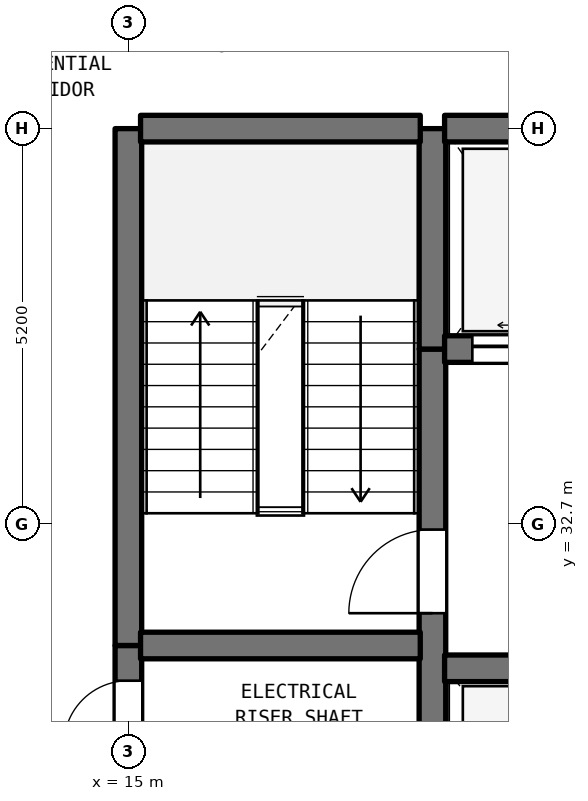
"""IFC4 building model, lengths in metres.
Left out: names, types, materials, properties, quantities, classifications, styles, units other than length and angle.
Written with IfcOpenShell. Run it as: python <this file> out.ifc"""

import sys

from ifc_helpers import new_model, si_unit, direction, frame, frame_2d, origin, place, context, subcontext, project, spatial, rectangle, extrude, element, fill, save


model = new_model("IFC4")
c1 = context("Model", 3, precision=1e-05, world=origin(), true_north=direction((0.0, 1.0)))
c2 = subcontext(c1, "Body", "Model", "MODEL_VIEW")
j1 = project(units=[si_unit("LENGTHUNIT", "METRE"), si_unit("PLANEANGLEUNIT", "RADIAN")], contexts=[c1])
p1 = place(None, origin())
s1 = spatial("IfcSite", under=j1, at=p1, CompositionType="ELEMENT")
p2 = place(p1, origin())
s2 = spatial("IfcBuilding", under=s1, at=p2, CompositionType="ELEMENT")
p3 = place(p2, frame((0.0, 0.0, 98.3)))
s3 = spatial("IfcBuildingStorey", under=s2, at=p3, CompositionType="ELEMENT", Elevation=98.3)
p4 = place(p3, frame((15.0, 29.5, 0.0), z_axis=(0.0, 0.0, 1.0), x_axis=(0.0, 1.0, 0.0)))
e1 = element("IfcWall", 1, at=p4, inside=s3, PredefinedType="SHEAR", context=c2, shape_type="SweptSolid", body=[
    extrude(rectangle(XDim=1.6, YDim=0.35, at=frame_2d((0.8, 0.0))), origin(), (0.0, 0.0, 1.0), 3.385),
])
p5 = place(p4, frame((0.287, 0.0, 0.0)))
e2 = element("IfcOpeningElement", 2, at=p5, cuts=e1, PredefinedType="OPENING", context=c2, shape_type="SweptSolid", body=[
    extrude(rectangle(XDim=0.85, YDim=2.1, at=frame_2d((0.425, 1.05))), frame((0.0, 0.185, 0.0), z_axis=(0.0, -1.0, 0.0), x_axis=(1.0, 0.0, 0.0)), (0.0, 0.0, 1.0), 0.37),
])
p6 = place(p3, frame((15.0, 31.1, 0.0), z_axis=(0.0, 0.0, 1.0), x_axis=(0.0, 1.0, 0.0)))
e3 = element("IfcWall", 3, at=p6, inside=s3, PredefinedType="SHEAR", context=c2, shape_type="SweptSolid", body=[
    extrude(rectangle(XDim=6.8, YDim=0.35, at=frame_2d((3.4, 0.0))), origin(), (0.0, 0.0, 1.0), 3.385),
])
p7 = place(p3, frame((19.0, 29.5, 0.0), z_axis=(0.0, 0.0, 1.0), x_axis=(0.0, 1.0, 0.0)))
e4 = element("IfcWall", 4, at=p7, inside=s3, PredefinedType="SHEAR", context=c2, shape_type="SweptSolid", body=[
    extrude(rectangle(XDim=5.5, YDim=0.35, at=frame_2d((2.75, 0.0))), origin(), (0.0, 0.0, 1.0), 3.385),
])
p8 = place(p7, frame((2.025, 0.0, 0.0)))
e5 = element("IfcOpeningElement", 5, at=p8, cuts=e4, PredefinedType="OPENING", context=c2, shape_type="SweptSolid", body=[
    extrude(rectangle(XDim=1.1, YDim=2.15, at=frame_2d((0.55, 1.075))), frame((0.0, 0.185, 0.0), z_axis=(0.0, -1.0, 0.0), x_axis=(1.0, 0.0, 0.0)), (0.0, 0.0, 1.0), 0.37),
])
p9 = place(p3, frame((19.0, 35.0, 0.0), z_axis=(0.0, 0.0, 1.0), x_axis=(0.0, 1.0, 0.0)))
e6 = element("IfcWall", 6, at=p9, inside=s3, PredefinedType="SHEAR", context=c2, shape_type="SweptSolid", body=[
    extrude(rectangle(XDim=2.9, YDim=0.35, at=frame_2d((1.45, 0.0))), origin(), (0.0, 0.0, 1.0), 3.385),
])
p10 = place(p3, frame((19.16, 30.8, 0.0), z_axis=(0.0, 0.0, 1.0), x_axis=(1.0, 0.0, 0.0)))
e7 = element("IfcWall", 7, at=p10, inside=s3, PredefinedType="SHEAR", context=c2, shape_type="SweptSolid", body=[
    extrude(rectangle(XDim=4.48, YDim=0.35, at=frame_2d((2.24, 0.0))), origin(), (0.0, 0.0, 1.0), 3.385),
])
p11 = place(p3, frame((15.16, 31.1, 0.0), z_axis=(0.0, 0.0, 1.0), x_axis=(1.0, 0.0, 0.0)))
e8 = element("IfcWall", 8, at=p11, inside=s3, PredefinedType="SHEAR", context=c2, shape_type="SweptSolid", body=[
    extrude(rectangle(XDim=3.68, YDim=0.35, at=frame_2d((1.84, 0.0))), origin(), (0.0, 0.0, 1.0), 3.385),
])
p12 = place(p3, frame((19.16, 35.0, 0.0), z_axis=(0.0, 0.0, 1.0), x_axis=(1.0, 0.0, 0.0)))
e9 = element("IfcWall", 9, at=p12, inside=s3, PredefinedType="SHEAR", context=c2, shape_type="SweptSolid", body=[
    extrude(rectangle(XDim=11.48, YDim=0.35, at=frame_2d((5.74, 0.0))), origin(), (0.0, 0.0, 1.0), 3.385),
])
p13 = place(p12, frame((0.365, 0.0, 0.0)))
e10 = element("IfcOpeningElement", 10, at=p13, cuts=e9, PredefinedType="OPENING", context=c2, shape_type="SweptSolid", body=[
    extrude(rectangle(XDim=1.35, YDim=2.2, at=frame_2d((0.675, 1.1))), frame((0.0, 0.185, 0.0), z_axis=(0.0, -1.0, 0.0), x_axis=(1.0, 0.0, 0.0)), (0.0, 0.0, 1.0), 0.37),
])
p14 = place(p12, frame((2.765, 0.0, 0.0)))
e11 = element("IfcOpeningElement", 11, at=p14, cuts=e9, PredefinedType="OPENING", context=c2, shape_type="SweptSolid", body=[
    extrude(rectangle(XDim=1.35, YDim=2.2, at=frame_2d((0.675, 1.1))), frame((0.0, 0.185, 0.0), z_axis=(0.0, -1.0, 0.0), x_axis=(1.0, 0.0, 0.0)), (0.0, 0.0, 1.0), 0.37),
])
p15 = place(p12, frame((4.915, 0.0, 0.0)))
e12 = element("IfcOpeningElement", 12, at=p15, cuts=e9, PredefinedType="OPENING", context=c2, shape_type="SweptSolid", body=[
    extrude(rectangle(XDim=1.2, YDim=2.2, at=frame_2d((0.6, 1.1))), frame((0.0, 0.185, 0.0), z_axis=(0.0, -1.0, 0.0), x_axis=(1.0, 0.0, 0.0)), (0.0, 0.0, 1.0), 0.37),
])
p16 = place(p12, frame((6.665, 0.0, 0.0)))
e13 = element("IfcOpeningElement", 13, at=p16, cuts=e9, PredefinedType="OPENING", context=c2, shape_type="SweptSolid", body=[
    extrude(rectangle(XDim=1.2, YDim=2.2, at=frame_2d((0.6, 1.1))), frame((0.0, 0.185, 0.0), z_axis=(0.0, -1.0, 0.0), x_axis=(1.0, 0.0, 0.0)), (0.0, 0.0, 1.0), 0.37),
])
p17 = place(p12, frame((8.415, 0.0, 0.0)))
e14 = element("IfcOpeningElement", 14, at=p17, cuts=e9, PredefinedType="OPENING", context=c2, shape_type="SweptSolid", body=[
    extrude(rectangle(XDim=1.2, YDim=2.2, at=frame_2d((0.6, 1.1))), frame((0.0, 0.185, 0.0), z_axis=(0.0, -1.0, 0.0), x_axis=(1.0, 0.0, 0.0)), (0.0, 0.0, 1.0), 0.37),
])
p18 = place(p12, frame((10.16, 0.0, 0.0)))
e15 = element("IfcOpeningElement", 15, at=p18, cuts=e9, PredefinedType="OPENING", context=c2, shape_type="SweptSolid", body=[
    extrude(rectangle(XDim=1.2, YDim=2.2, at=frame_2d((0.6, 1.1))), frame((0.0, 0.185, 0.0), z_axis=(0.0, -1.0, 0.0), x_axis=(1.0, 0.0, 0.0)), (0.0, 0.0, 1.0), 0.37),
])
p19 = place(p3, frame((15.16, 37.9, 0.0), z_axis=(0.0, 0.0, 1.0), x_axis=(1.0, 0.0, 0.0)))
e16 = element("IfcWall", 16, at=p19, inside=s3, PredefinedType="SHEAR", context=c2, shape_type="SweptSolid", body=[
    extrude(rectangle(XDim=3.68, YDim=0.35, at=frame_2d((1.84, 0.0))), origin(), (0.0, 0.0, 1.0), 3.385),
])
p20 = place(p3, frame((19.16, 37.9, 0.0), z_axis=(0.0, 0.0, 1.0), x_axis=(1.0, 0.0, 0.0)))
e17 = element("IfcWall", 17, at=p20, inside=s3, PredefinedType="SHEAR", context=c2, shape_type="SweptSolid", body=[
    extrude(rectangle(XDim=11.48, YDim=0.35, at=frame_2d((5.74, 0.0))), origin(), (0.0, 0.0, 1.0), 3.385),
])
p21 = place(p5, origin())
e18 = element("IfcDoor", 18, at=p21, inside=s3, OperationType="SINGLE_SWING_LEFT", PredefinedType="DOOR", context=c2, shape_type="SweptSolid", body=[
    extrude(rectangle(XDim=0.85, YDim=2.1, at=frame_2d((0.425, 1.05))), frame((0.0, 0.025, 0.0), z_axis=(0.0, -1.0, 0.0), x_axis=(1.0, 0.0, 0.0)), (0.0, 0.0, 1.0), 0.05),
])
fill(e2, e18)
p22 = place(p8, origin())
e19 = element("IfcDoor", 19, at=p22, inside=s3, OperationType="SINGLE_SWING_LEFT", PredefinedType="DOOR", context=c2, shape_type="SweptSolid", body=[
    extrude(rectangle(XDim=1.1, YDim=2.15, at=frame_2d((0.55, 1.075))), frame((0.0, 0.025, 0.0), z_axis=(0.0, -1.0, 0.0), x_axis=(1.0, 0.0, 0.0)), (0.0, 0.0, 1.0), 0.05),
])
fill(e5, e19)
p23 = place(p13, origin())
e20 = element("IfcDoor", 20, at=p23, inside=s3, OperationType="DOUBLE_DOOR_SLIDING", PredefinedType="DOOR", context=c2, shape_type="SweptSolid", body=[
    extrude(rectangle(XDim=1.35, YDim=2.2, at=frame_2d((0.675, 1.1))), frame((0.0, 0.025, 0.0), z_axis=(0.0, -1.0, 0.0), x_axis=(1.0, 0.0, 0.0)), (0.0, 0.0, 1.0), 0.05),
])
fill(e10, e20)
save(model, sys.argv[1])
